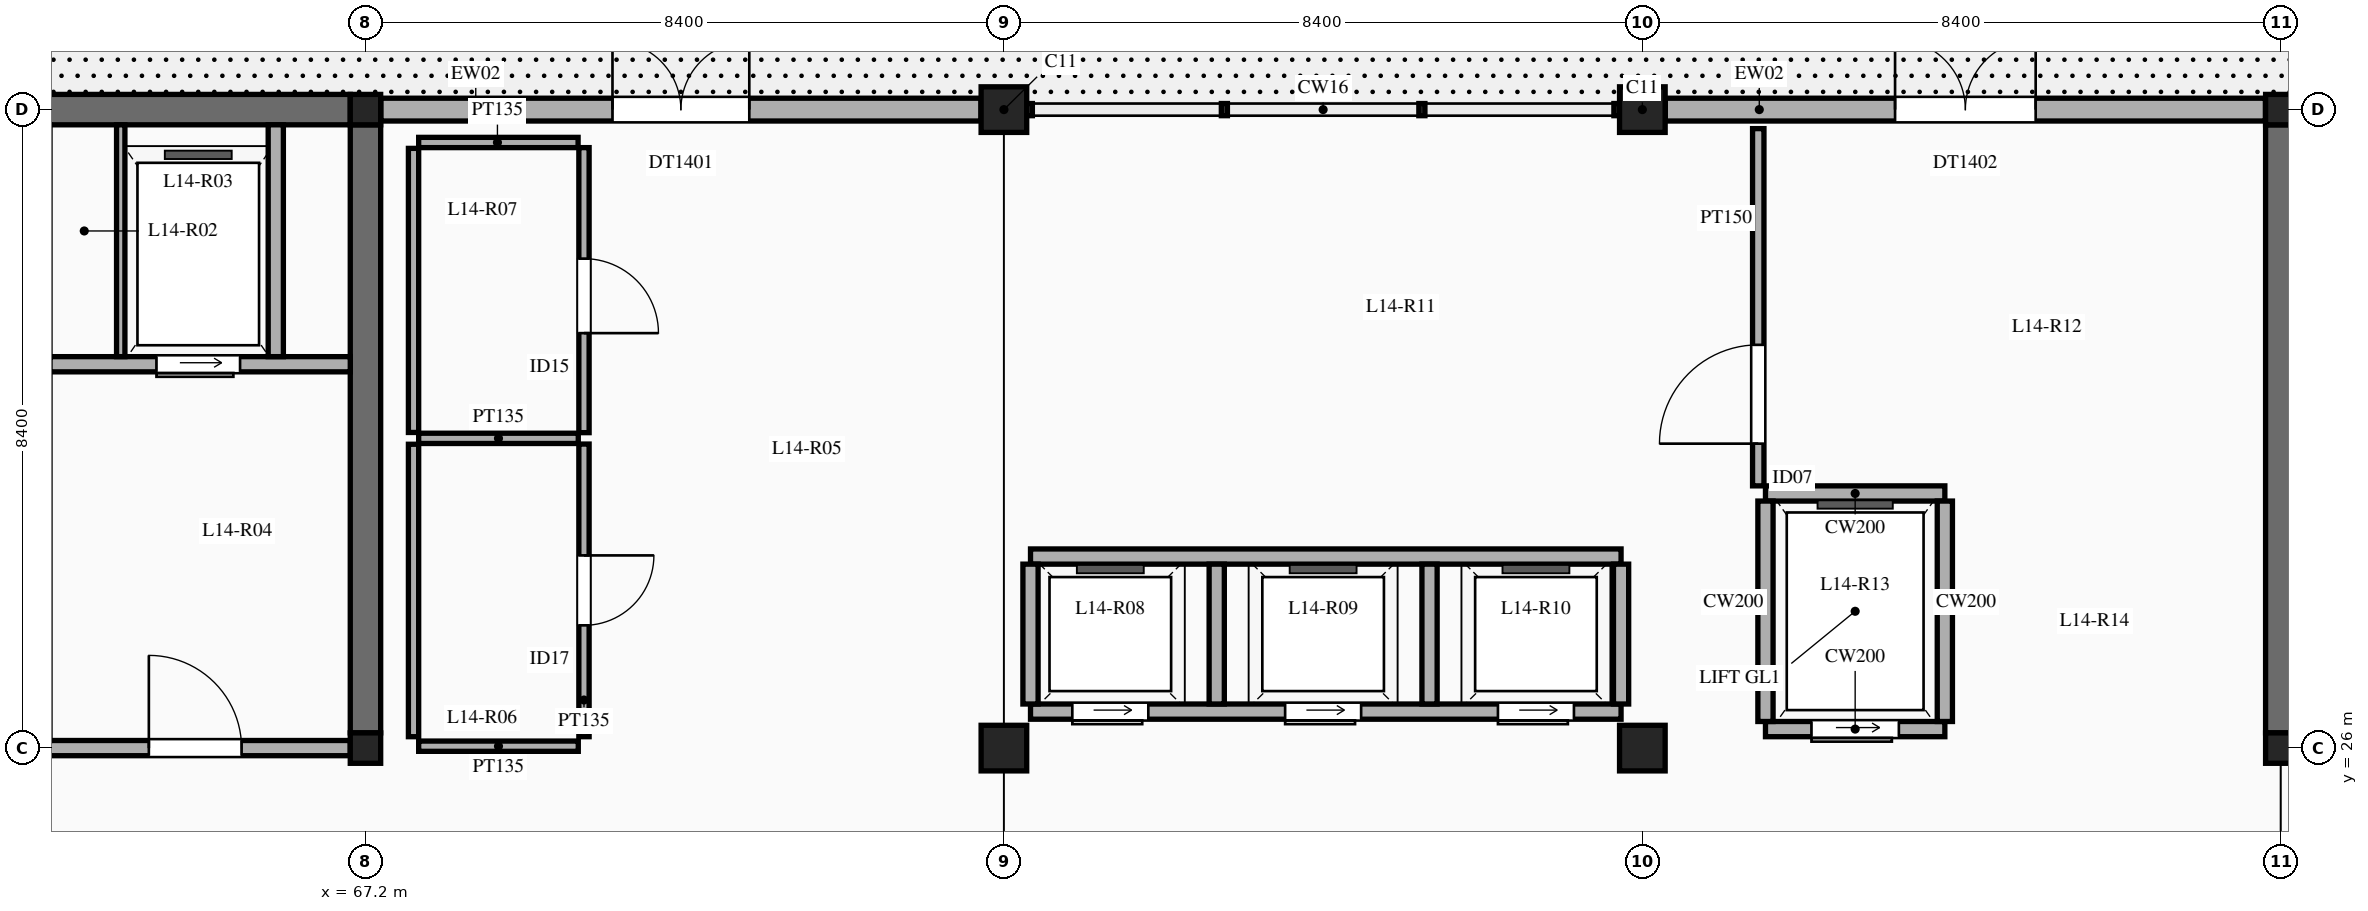
"""IFC4 building model, lengths in metres.
Left out: names, types, materials, properties, quantities, classifications, styles, units other than length and angle.
Written with IfcOpenShell. Run it as: python <this file> out.ifc"""

import sys

from ifc_helpers import new_model, si_unit, direction, frame, frame_2d, origin, origin_2d, place, context, subcontext, project, spatial, rectangle, extrude, element, fill, save


model = new_model("IFC4")
c1 = context("Model", 3, precision=1e-05, world=origin(), true_north=direction((0.0, 1.0)))
c2 = subcontext(c1, "Body", "Model", "MODEL_VIEW")
j1 = project(units=[si_unit("LENGTHUNIT", "METRE"), si_unit("PLANEANGLEUNIT", "RADIAN")], contexts=[c1])
p1 = place(None, origin())
s1 = spatial("IfcSite", under=j1, at=p1, CompositionType="ELEMENT")
p2 = place(p1, origin())
s2 = spatial("IfcBuilding", under=s1, at=p2, CompositionType="ELEMENT")
p3 = place(p2, frame((0.0, 0.0, 64.5)))
s3 = spatial("IfcBuildingStorey", under=s2, at=p3, CompositionType="ELEMENT", Elevation=64.5)
for number, where, z_axis, x_axis in (
    (1, (67.2, 26.0, 0.0), (0.0, 0.0, 1.0), (1.0, 0.0, 0.0)),
    (2, (67.2, 34.4, 0.0), (0.0, 0.0, 1.0), (1.0, 0.0, 0.0)),
):
    element("IfcColumn", number, at=place(p3, frame(where, z_axis=z_axis, x_axis=x_axis)), inside=s3, PredefinedType="COLUMN", context=c2, shape_type="SweptSolid", body=[
        extrude(rectangle(XDim=0.4, YDim=0.4, at=origin_2d()), origin(), (0.0, 0.0, 1.0), 4.5),
    ])
for number, where, z_axis, x_axis in (
    (3, (75.6, 26.0, 0.0), (0.0, 0.0, 1.0), (1.0, 0.0, 0.0)),
    (4, (75.6, 34.4, 0.0), (0.0, 0.0, 1.0), (1.0, 0.0, 0.0)),
    (5, (84.0, 26.0, 0.0), (0.0, 0.0, 1.0), (1.0, 0.0, 0.0)),
    (6, (84.0, 34.4, 0.0), (0.0, 0.0, 1.0), (1.0, 0.0, 0.0)),
):
    element("IfcColumn", number, at=place(p3, frame(where, z_axis=z_axis, x_axis=x_axis)), inside=s3, PredefinedType="COLUMN", context=c2, shape_type="SweptSolid", body=[
        extrude(rectangle(XDim=0.6, YDim=0.6, at=origin_2d()), origin(), (0.0, 0.0, 1.0), 4.5),
    ])
for number, where, z_axis, x_axis in (
    (7, (92.4, 26.0, 0.0), (0.0, 0.0, 1.0), (1.0, 0.0, 0.0)),
    (8, (92.4, 34.4, 0.0), (0.0, 0.0, 1.0), (1.0, 0.0, 0.0)),
):
    element("IfcColumn", number, at=place(p3, frame(where, z_axis=z_axis, x_axis=x_axis)), inside=s3, PredefinedType="COLUMN", context=c2, shape_type="SweptSolid", body=[
        extrude(rectangle(XDim=0.4, YDim=0.4, at=origin_2d()), origin(), (0.0, 0.0, 1.0), 4.5),
    ])
for number, where, z_axis, x_axis in (
    (9, (67.2, 26.2, 0.0), (0.0, 0.0, 1.0), (0.0, 1.0, 0.0)),
    (10, (59.0, 34.4, 0.0), (0.0, 0.0, 1.0), (1.0, 0.0, 0.0)),
    (11, (92.4, 26.2, 0.0), (0.0, 0.0, 1.0), (0.0, 1.0, 0.0)),
):
    element("IfcWall", number, at=place(p3, frame(where, z_axis=z_axis, x_axis=x_axis)), inside=s3, PredefinedType="SHEAR", context=c2, shape_type="SweptSolid", body=[
        extrude(rectangle(XDim=8.0, YDim=0.4, at=frame_2d((4.0, 0.0))), origin(), (0.0, 0.0, 1.0), 4.5),
    ])
p4 = place(p3, frame((67.402, 34.4, 0.0), z_axis=(0.0, 0.0, 1.0), x_axis=(1.0, 0.0, 0.0)))
e12 = element("IfcWall", 12, at=p4, inside=s3, PredefinedType="SOLIDWALL", context=c2, shape_type="SweptSolid", body=[
    extrude(rectangle(XDim=7.896, YDim=0.3, at=frame_2d((3.948, 0.0))), origin(), (0.0, 0.0, 1.0), 3.55),
])
p5 = place(p4, frame((3.048, 0.0, 0.0)))
e13 = element("IfcOpeningElement", 13, at=p5, cuts=e12, PredefinedType="OPENING", context=c2, shape_type="SweptSolid", body=[
    extrude(rectangle(XDim=1.8, YDim=2.25, at=frame_2d((0.9, 1.125))), frame((0.0, 0.16, 0.0), z_axis=(0.0, -1.0, 0.0), x_axis=(1.0, 0.0, 0.0)), (0.0, 0.0, 1.0), 0.32),
])
p6 = place(p3, frame((84.302, 34.4, 0.0), z_axis=(0.0, 0.0, 1.0), x_axis=(1.0, 0.0, 0.0)))
e14 = element("IfcWall", 14, at=p6, inside=s3, PredefinedType="SOLIDWALL", context=c2, shape_type="SweptSolid", body=[
    extrude(rectangle(XDim=7.896, YDim=0.3, at=frame_2d((3.948, 0.0))), origin(), (0.0, 0.0, 1.0), 3.55),
])
p7 = place(p6, frame((3.023, 0.0, 0.0)))
e15 = element("IfcOpeningElement", 15, at=p7, cuts=e14, PredefinedType="OPENING", context=c2, shape_type="SweptSolid", body=[
    extrude(rectangle(XDim=1.85, YDim=2.25, at=frame_2d((0.925, 1.125))), frame((0.0, 0.16, 0.0), z_axis=(0.0, -1.0, 0.0), x_axis=(1.0, 0.0, 0.0)), (0.0, 0.0, 1.0), 0.32),
])
p8 = place(p3, frame((59.0, 26.0, 0.0), z_axis=(0.0, 0.0, 1.0), x_axis=(1.0, 0.0, 0.0)))
e16 = element("IfcWall", 16, at=p8, inside=s3, PredefinedType="SOLIDWALL", context=c2, shape_type="SweptSolid", body=[
    extrude(rectangle(XDim=8.0, YDim=0.2, at=frame_2d((4.0, 0.0))), origin(), (0.0, 0.0, 1.0), 3.88),
])
p9 = place(p8, frame((1.55, 0.0, 0.0)))
e17 = element("IfcOpeningElement", 17, at=p9, cuts=e16, PredefinedType="OPENING", context=c2, shape_type="SweptSolid", body=[
    extrude(rectangle(XDim=1.15, YDim=2.15, at=frame_2d((0.575, 1.075))), frame((0.0, 0.11, 0.0), z_axis=(0.0, -1.0, 0.0), x_axis=(1.0, 0.0, 0.0)), (0.0, 0.0, 1.0), 0.22),
])
p10 = place(p8, frame((5.35, 0.0, 0.0)))
e18 = element("IfcOpeningElement", 18, at=p10, cuts=e16, PredefinedType="OPENING", context=c2, shape_type="SweptSolid", body=[
    extrude(rectangle(XDim=1.22, YDim=2.15, at=frame_2d((0.61, 1.075))), frame((0.0, 0.11, 0.0), z_axis=(0.0, -1.0, 0.0), x_axis=(1.0, 0.0, 0.0)), (0.0, 0.0, 1.0), 0.22),
])
p11 = place(p3, frame((63.05, 31.05, 0.0), z_axis=(0.0, 0.0, 1.0), x_axis=(1.0, 0.0, 0.0)))
e19 = element("IfcWall", 19, at=p11, inside=s3, PredefinedType="SOLIDWALL", context=c2, shape_type="SweptSolid", body=[
    extrude(rectangle(XDim=3.95, YDim=0.2, at=frame_2d((1.975, 0.0))), origin(), (0.0, 0.0, 1.0), 4.3),
])
p12 = place(p11, frame((1.4, 0.0, 0.0)))
e20 = element("IfcOpeningElement", 20, at=p12, cuts=e19, PredefinedType="OPENING", context=c2, shape_type="SweptSolid", body=[
    extrude(rectangle(XDim=1.1, YDim=2.15, at=frame_2d((0.55, 1.075))), frame((0.0, 0.11, 0.0), z_axis=(0.0, -1.0, 0.0), x_axis=(1.0, 0.0, 0.0)), (0.0, 0.0, 1.0), 0.22),
])
p13 = place(p3, frame((63.98, 31.15, 0.0), z_axis=(0.0, 0.0, 1.0), x_axis=(0.0, 1.0, 0.0)))
e21 = element("IfcWall", 21, at=p13, inside=s3, PredefinedType="PARTITIONING", context=c2, shape_type="SweptSolid", body=[
    extrude(rectangle(XDim=3.05, YDim=0.11, at=frame_2d((1.525, 0.0))), origin(), (0.0, 0.0, 1.0), 4.3),
])
p14 = place(p3, frame((66.02, 31.15, 0.0), z_axis=(0.0, 0.0, 1.0), x_axis=(0.0, 1.0, 0.0)))
e22 = element("IfcWall", 22, at=p14, inside=s3, PredefinedType="SOLIDWALL", context=c2, shape_type="SweptSolid", body=[
    extrude(rectangle(XDim=3.05, YDim=0.2, at=frame_2d((1.525, 0.0))), origin(), (0.0, 0.0, 1.0), 4.3),
])
p15 = place(p3, frame((75.95, 26.48, 0.0), z_axis=(0.0, 0.0, 1.0), x_axis=(1.0, 0.0, 0.0)))
e23 = element("IfcWall", 23, at=p15, inside=s3, PredefinedType="SOLIDWALL", context=c2, shape_type="SweptSolid", body=[
    extrude(rectangle(XDim=7.77, YDim=0.2, at=frame_2d((3.885, 0.0))), origin(), (0.0, 0.0, 1.0), 4.3),
])
p16 = place(p15, frame((0.55, 0.0, 0.0)))
e24 = element("IfcOpeningElement", 24, at=p16, cuts=e23, PredefinedType="OPENING", context=c2, shape_type="SweptSolid", body=[
    extrude(rectangle(XDim=1.0, YDim=2.15, at=frame_2d((0.5, 1.075))), frame((0.0, 0.11, 0.0), z_axis=(0.0, -1.0, 0.0), x_axis=(1.0, 0.0, 0.0)), (0.0, 0.0, 1.0), 0.22),
])
p17 = place(p15, frame((3.35, 0.0, 0.0)))
e25 = element("IfcOpeningElement", 25, at=p17, cuts=e23, PredefinedType="OPENING", context=c2, shape_type="SweptSolid", body=[
    extrude(rectangle(XDim=1.0, YDim=2.15, at=frame_2d((0.5, 1.075))), frame((0.0, 0.11, 0.0), z_axis=(0.0, -1.0, 0.0), x_axis=(1.0, 0.0, 0.0)), (0.0, 0.0, 1.0), 0.22),
])
p18 = place(p15, frame((6.15, 0.0, 0.0)))
e26 = element("IfcOpeningElement", 26, at=p18, cuts=e23, PredefinedType="OPENING", context=c2, shape_type="SweptSolid", body=[
    extrude(rectangle(XDim=1.0, YDim=2.15, at=frame_2d((0.5, 1.075))), frame((0.0, 0.11, 0.0), z_axis=(0.0, -1.0, 0.0), x_axis=(1.0, 0.0, 0.0)), (0.0, 0.0, 1.0), 0.22),
])
p19 = place(p3, frame((75.95, 28.52, 0.0), z_axis=(0.0, 0.0, 1.0), x_axis=(1.0, 0.0, 0.0)))
e27 = element("IfcWall", 27, at=p19, inside=s3, PredefinedType="SOLIDWALL", context=c2, shape_type="SweptSolid", body=[
    extrude(rectangle(XDim=7.77, YDim=0.2, at=frame_2d((3.885, 0.0))), origin(), (0.0, 0.0, 1.0), 4.3),
])
for number, where, z_axis, x_axis in (
    (28, (75.95, 26.58, 0.0), (0.0, 0.0, 1.0), (0.0, 1.0, 0.0)),
    (29, (78.4, 26.58, 0.0), (0.0, 0.0, 1.0), (0.0, 1.0, 0.0)),
    (30, (81.2, 26.58, 0.0), (0.0, 0.0, 1.0), (0.0, 1.0, 0.0)),
):
    element("IfcWall", number, at=place(p3, frame(where, z_axis=z_axis, x_axis=x_axis)), inside=s3, PredefinedType="SOLIDWALL", context=c2, shape_type="SweptSolid", body=[
        extrude(rectangle(XDim=1.84, YDim=0.2, at=frame_2d((0.92, 0.0))), origin(), (0.0, 0.0, 1.0), 4.3),
    ])
p20 = place(p3, frame((83.72, 26.58, 0.0), z_axis=(0.0, 0.0, 1.0), x_axis=(0.0, 1.0, 0.0)))
e31 = element("IfcWall", 31, at=p20, inside=s3, PredefinedType="SOLIDWALL", context=c2, shape_type="SweptSolid", body=[
    extrude(rectangle(XDim=1.84, YDim=0.2, at=frame_2d((0.92, 0.0))), origin(), (0.0, 0.0, 1.0), 3.93),
])
p21 = place(p3, frame((85.62, 26.25, 0.0), z_axis=(0.0, 0.0, 1.0), x_axis=(1.0, 0.0, 0.0)))
e32 = element("IfcWall", 32, at=p21, inside=s3, PredefinedType="SOLIDWALL", context=c2, shape_type="SweptSolid", body=[
    extrude(rectangle(XDim=2.36, YDim=0.2, at=frame_2d((1.18, 0.0))), origin(), (0.0, 0.0, 1.0), 3.88),
])
p22 = place(p21, frame((0.605, 0.0, 0.0)))
e33 = element("IfcOpeningElement", 33, at=p22, cuts=e32, PredefinedType="OPENING", context=c2, shape_type="SweptSolid", body=[
    extrude(rectangle(XDim=1.15, YDim=2.2, at=frame_2d((0.575, 1.1))), frame((0.0, 0.11, 0.0), z_axis=(0.0, -1.0, 0.0), x_axis=(1.0, 0.0, 0.0)), (0.0, 0.0, 1.0), 0.22),
])
p23 = place(p3, frame((85.62, 29.35, 0.0), z_axis=(0.0, 0.0, 1.0), x_axis=(1.0, 0.0, 0.0)))
e34 = element("IfcWall", 34, at=p23, inside=s3, PredefinedType="SOLIDWALL", context=c2, shape_type="SweptSolid", body=[
    extrude(rectangle(XDim=2.36, YDim=0.2, at=frame_2d((1.18, 0.0))), origin(), (0.0, 0.0, 1.0), 4.3),
])
p24 = place(p3, frame((85.62, 26.35, 0.0), z_axis=(0.0, 0.0, 1.0), x_axis=(0.0, 1.0, 0.0)))
e35 = element("IfcWall", 35, at=p24, inside=s3, PredefinedType="SOLIDWALL", context=c2, shape_type="SweptSolid", body=[
    extrude(rectangle(XDim=2.9, YDim=0.2, at=frame_2d((1.45, 0.0))), origin(), (0.0, 0.0, 1.0), 4.3),
])
p25 = place(p3, frame((87.98, 26.35, 0.0), z_axis=(0.0, 0.0, 1.0), x_axis=(0.0, 1.0, 0.0)))
e36 = element("IfcWall", 36, at=p25, inside=s3, PredefinedType="SOLIDWALL", context=c2, shape_type="SweptSolid", body=[
    extrude(rectangle(XDim=2.9, YDim=0.2, at=frame_2d((1.45, 0.0))), origin(), (0.0, 0.0, 1.0), 4.03),
])
p26 = place(p3, frame((70.075, 26.15, 0.0), z_axis=(0.0, 0.0, 1.0), x_axis=(0.0, 1.0, 0.0)))
e37 = element("IfcWall", 37, at=p26, inside=s3, PredefinedType="PARTITIONING", context=c2, shape_type="SweptSolid", body=[
    extrude(rectangle(XDim=3.85, YDim=0.135, at=frame_2d((1.925, 0.0))), origin(), (0.0, 0.0, 1.0), 3.45),
])
p27 = place(p26, frame((1.465, 0.0, 0.0)))
e38 = element("IfcOpeningElement", 38, at=p27, cuts=e37, PredefinedType="OPENING", context=c2, shape_type="SweptSolid", body=[
    extrude(rectangle(XDim=0.92, YDim=2.12, at=frame_2d((0.46, 1.06))), frame((0.0, 0.077, 0.0), z_axis=(0.0, -1.0, 0.0), x_axis=(1.0, 0.0, 0.0)), (0.0, 0.0, 1.0), 0.155),
])
p28 = place(p3, frame((70.075, 30.15, 0.0), z_axis=(0.0, 0.0, 1.0), x_axis=(0.0, 1.0, 0.0)))
e39 = element("IfcWall", 39, at=p28, inside=s3, PredefinedType="PARTITIONING", context=c2, shape_type="SweptSolid", body=[
    extrude(rectangle(XDim=3.75, YDim=0.135, at=frame_2d((1.875, 0.0))), origin(), (0.0, 0.0, 1.0), 3.45),
])
p29 = place(p28, frame((1.309, 0.0, 0.0)))
e40 = element("IfcOpeningElement", 40, at=p29, cuts=e39, PredefinedType="OPENING", context=c2, shape_type="SweptSolid", body=[
    extrude(rectangle(XDim=0.98, YDim=2.15, at=frame_2d((0.49, 1.075))), frame((0.0, 0.077, 0.0), z_axis=(0.0, -1.0, 0.0), x_axis=(1.0, 0.0, 0.0)), (0.0, 0.0, 1.0), 0.155),
])
for number, where, z_axis, x_axis in (
    (41, (67.9, 30.075, 0.0), (0.0, 0.0, 1.0), (1.0, 0.0, 0.0)),
    (42, (67.9, 26.025, 0.0), (0.0, 0.0, 1.0), (1.0, 0.0, 0.0)),
):
    element("IfcWall", number, at=place(p3, frame(where, z_axis=z_axis, x_axis=x_axis)), inside=s3, PredefinedType="PARTITIONING", context=c2, shape_type="SweptSolid", body=[
        extrude(rectangle(XDim=2.1, YDim=0.135, at=frame_2d((1.05, 0.0))), origin(), (0.0, 0.0, 1.0), 3.45),
    ])
p30 = place(p3, frame((85.525, 29.45, 0.0), z_axis=(0.0, 0.0, 1.0), x_axis=(0.0, 1.0, 0.0)))
e43 = element("IfcWall", 43, at=p30, inside=s3, PredefinedType="PARTITIONING", context=c2, shape_type="SweptSolid", body=[
    extrude(rectangle(XDim=4.7, YDim=0.15, at=frame_2d((2.35, 0.0))), origin(), (0.0, 0.0, 1.0), 3.45),
])
p31 = place(p30, frame((0.555, 0.0, 0.0)))
e44 = element("IfcOpeningElement", 44, at=p31, cuts=e43, PredefinedType="OPENING", context=c2, shape_type="SweptSolid", body=[
    extrude(rectangle(XDim=1.3, YDim=2.25, at=frame_2d((0.65, 1.125))), frame((0.0, 0.085, 0.0), z_axis=(0.0, -1.0, 0.0), x_axis=(1.0, 0.0, 0.0)), (0.0, 0.0, 1.0), 0.17),
])
p32 = place(p3, frame((67.833, 26.15, 0.0), z_axis=(0.0, 0.0, 1.0), x_axis=(0.0, 1.0, 0.0)))
e45 = element("IfcWall", 45, at=p32, inside=s3, PredefinedType="PARTITIONING", context=c2, shape_type="SweptSolid", body=[
    extrude(rectangle(XDim=3.848, YDim=0.135, at=frame_2d((1.924, 0.0))), origin(), (0.0, 0.0, 1.0), 3.45),
])
p33 = place(p3, frame((67.9, 33.968, 0.0), z_axis=(0.0, 0.0, 1.0), x_axis=(1.0, 0.0, 0.0)))
e46 = element("IfcWall", 46, at=p33, inside=s3, PredefinedType="PARTITIONING", context=c2, shape_type="SweptSolid", body=[
    extrude(rectangle(XDim=2.098, YDim=0.135, at=frame_2d((1.049, 0.0))), origin(), (0.0, 0.0, 1.0), 3.45),
])
p34 = place(p3, frame((67.833, 30.153, 0.0), z_axis=(0.0, 0.0, 1.0), x_axis=(0.0, 1.0, 0.0)))
e47 = element("IfcWall", 47, at=p34, inside=s3, PredefinedType="PARTITIONING", context=c2, shape_type="SweptSolid", body=[
    extrude(rectangle(XDim=3.737, YDim=0.135, at=frame_2d((1.869, 0.0))), origin(), (0.0, 0.0, 1.0), 3.45),
])
p35 = place(p5, origin())
e48 = element("IfcDoor", 48, at=p35, inside=s3, OperationType="DOUBLE_DOOR_SINGLE_SWING", PredefinedType="DOOR", context=c2, shape_type="SweptSolid", body=[
    extrude(rectangle(XDim=1.8, YDim=2.25, at=frame_2d((0.9, 1.125))), frame((0.0, 0.025, 0.0), z_axis=(0.0, -1.0, 0.0), x_axis=(1.0, 0.0, 0.0)), (0.0, 0.0, 1.0), 0.05),
])
fill(e13, e48)
p36 = place(p7, origin())
e49 = element("IfcDoor", 49, at=p36, inside=s3, OperationType="DOUBLE_DOOR_SINGLE_SWING", PredefinedType="DOOR", context=c2, shape_type="SweptSolid", body=[
    extrude(rectangle(XDim=1.85, YDim=2.25, at=frame_2d((0.925, 1.125))), frame((0.0, 0.025, 0.0), z_axis=(0.0, -1.0, 0.0), x_axis=(1.0, 0.0, 0.0)), (0.0, 0.0, 1.0), 0.05),
])
fill(e15, e49)
p37 = place(p10, origin())
e50 = element("IfcDoor", 50, at=p37, inside=s3, OperationType="SINGLE_SWING_LEFT", PredefinedType="DOOR", context=c2, shape_type="SweptSolid", body=[
    extrude(rectangle(XDim=1.22, YDim=2.15, at=frame_2d((0.61, 1.075))), frame((0.0, 0.025, 0.0), z_axis=(0.0, -1.0, 0.0), x_axis=(1.0, 0.0, 0.0)), (0.0, 0.0, 1.0), 0.05),
])
fill(e18, e50)
p38 = place(p12, frame((1.1, 0.0, 0.0), z_axis=(0.0, 0.0, 1.0), x_axis=(-1.0, 0.0, 0.0)))
e51 = element("IfcDoor", 51, at=p38, inside=s3, OperationType="SLIDING_TO_LEFT", PredefinedType="DOOR", context=c2, shape_type="SweptSolid", body=[
    extrude(rectangle(XDim=1.1, YDim=2.15, at=frame_2d((0.55, 1.075))), frame((0.0, 0.025, 0.0), z_axis=(0.0, -1.0, 0.0), x_axis=(1.0, 0.0, 0.0)), (0.0, 0.0, 1.0), 0.05),
])
fill(e20, e51)
p39 = place(p16, frame((1.0, 0.0, 0.0), z_axis=(0.0, 0.0, 1.0), x_axis=(-1.0, 0.0, 0.0)))
e52 = element("IfcDoor", 52, at=p39, inside=s3, OperationType="SLIDING_TO_LEFT", PredefinedType="DOOR", context=c2, shape_type="SweptSolid", body=[
    extrude(rectangle(XDim=1.0, YDim=2.15, at=frame_2d((0.5, 1.075))), frame((0.0, 0.025, 0.0), z_axis=(0.0, -1.0, 0.0), x_axis=(1.0, 0.0, 0.0)), (0.0, 0.0, 1.0), 0.05),
])
fill(e24, e52)
p40 = place(p17, frame((1.0, 0.0, 0.0), z_axis=(0.0, 0.0, 1.0), x_axis=(-1.0, 0.0, 0.0)))
e53 = element("IfcDoor", 53, at=p40, inside=s3, OperationType="SLIDING_TO_LEFT", PredefinedType="DOOR", context=c2, shape_type="SweptSolid", body=[
    extrude(rectangle(XDim=1.0, YDim=2.15, at=frame_2d((0.5, 1.075))), frame((0.0, 0.025, 0.0), z_axis=(0.0, -1.0, 0.0), x_axis=(1.0, 0.0, 0.0)), (0.0, 0.0, 1.0), 0.05),
])
fill(e25, e53)
p41 = place(p18, frame((1.0, 0.0, 0.0), z_axis=(0.0, 0.0, 1.0), x_axis=(-1.0, 0.0, 0.0)))
e54 = element("IfcDoor", 54, at=p41, inside=s3, OperationType="SLIDING_TO_LEFT", PredefinedType="DOOR", context=c2, shape_type="SweptSolid", body=[
    extrude(rectangle(XDim=1.0, YDim=2.15, at=frame_2d((0.5, 1.075))), frame((0.0, 0.025, 0.0), z_axis=(0.0, -1.0, 0.0), x_axis=(1.0, 0.0, 0.0)), (0.0, 0.0, 1.0), 0.05),
])
fill(e26, e54)
p42 = place(p22, frame((1.15, 0.0, 0.0), z_axis=(0.0, 0.0, 1.0), x_axis=(-1.0, 0.0, 0.0)))
e55 = element("IfcDoor", 55, at=p42, inside=s3, OperationType="SLIDING_TO_LEFT", PredefinedType="DOOR", context=c2, shape_type="SweptSolid", body=[
    extrude(rectangle(XDim=1.15, YDim=2.2, at=frame_2d((0.575, 1.1))), frame((0.0, 0.025, 0.0), z_axis=(0.0, -1.0, 0.0), x_axis=(1.0, 0.0, 0.0)), (0.0, 0.0, 1.0), 0.05),
])
fill(e33, e55)
p43 = place(p27, frame((0.92, 0.0, 0.0), z_axis=(0.0, 0.0, 1.0), x_axis=(-1.0, 0.0, 0.0)))
e56 = element("IfcDoor", 56, at=p43, inside=s3, OperationType="SINGLE_SWING_LEFT", PredefinedType="DOOR", context=c2, shape_type="SweptSolid", body=[
    extrude(rectangle(XDim=0.92, YDim=2.12, at=frame_2d((0.46, 1.06))), frame((0.0, 0.025, 0.0), z_axis=(0.0, -1.0, 0.0), x_axis=(1.0, 0.0, 0.0)), (0.0, 0.0, 1.0), 0.05),
])
fill(e38, e56)
p44 = place(p29, frame((0.98, 0.0, 0.0), z_axis=(0.0, 0.0, 1.0), x_axis=(-1.0, 0.0, 0.0)))
e57 = element("IfcDoor", 57, at=p44, inside=s3, OperationType="SINGLE_SWING_RIGHT", PredefinedType="DOOR", context=c2, shape_type="SweptSolid", body=[
    extrude(rectangle(XDim=0.98, YDim=2.15, at=frame_2d((0.49, 1.075))), frame((0.0, 0.025, 0.0), z_axis=(0.0, -1.0, 0.0), x_axis=(1.0, 0.0, 0.0)), (0.0, 0.0, 1.0), 0.05),
])
fill(e40, e57)
p45 = place(p31, origin())
e58 = element("IfcDoor", 58, at=p45, inside=s3, OperationType="SINGLE_SWING_LEFT", PredefinedType="DOOR", context=c2, shape_type="SweptSolid", body=[
    extrude(rectangle(XDim=1.3, YDim=2.25, at=frame_2d((0.65, 1.125))), frame((0.0, 0.025, 0.0), z_axis=(0.0, -1.0, 0.0), x_axis=(1.0, 0.0, 0.0)), (0.0, 0.0, 1.0), 0.05),
])
fill(e44, e58)
save(model, sys.argv[1])
